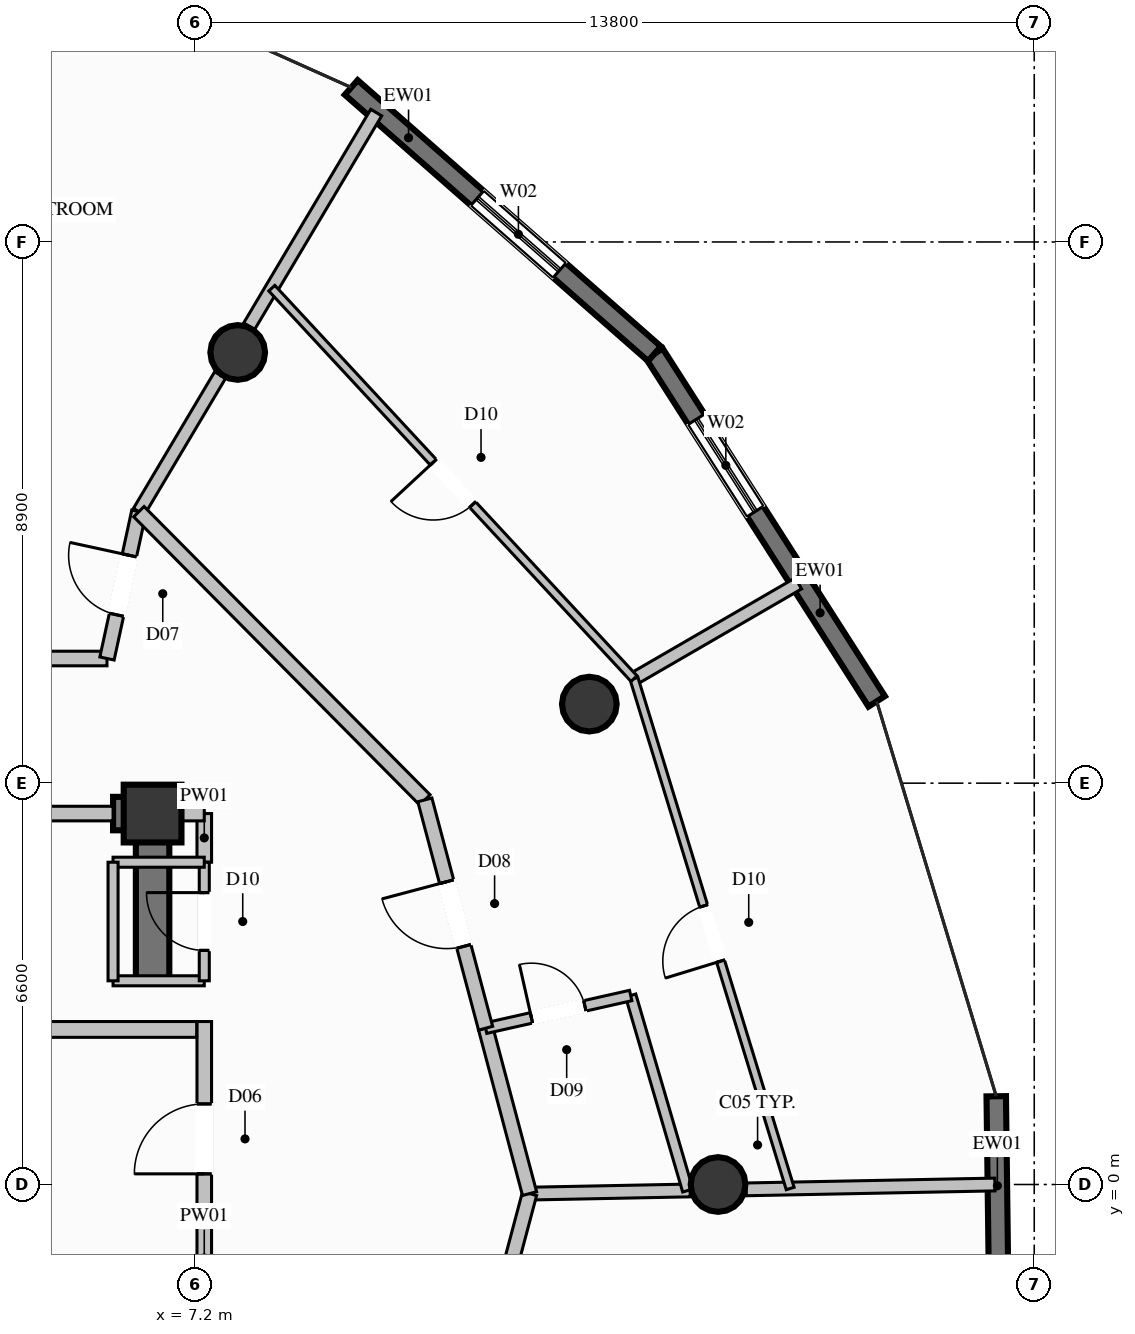
"""IFC4 building model, lengths in metres.
Left out: names, types, materials, properties, quantities, classifications, styles, units other than length and angle.
Written with IfcOpenShell. Run it as: python <this file> out.ifc"""

import sys

from ifc_helpers import new_model, si_unit, direction, frame, frame_2d, origin, origin_2d, place, context, subcontext, project, spatial, rectangle, circle, extrude, element, fill, save


model = new_model("IFC4")
c1 = context("Model", 3, precision=1e-05, world=origin(), true_north=direction((0.0, 1.0)))
c2 = subcontext(c1, "Body", "Model", "MODEL_VIEW")
j1 = project(units=[si_unit("LENGTHUNIT", "METRE"), si_unit("PLANEANGLEUNIT", "RADIAN")], contexts=[c1])
p1 = place(None, origin())
s1 = spatial("IfcSite", under=j1, at=p1, CompositionType="ELEMENT")
p2 = place(p1, origin())
s2 = spatial("IfcBuilding", under=s1, at=p2, CompositionType="ELEMENT")
p3 = place(p2, frame((0.0, 0.0, 205.6)))
s3 = spatial("IfcBuildingStorey", under=s2, at=p3, CompositionType="ELEMENT", Elevation=205.6)
p4 = place(p3, frame((6.5, 6.1, 0.0), z_axis=(0.0, 0.0, 1.0), x_axis=(1.0, 0.0, 0.0)))
e1 = element("IfcColumn", 1, at=p4, inside=s3, PredefinedType="COLUMN", context=c2, shape_type="SweptSolid", body=[
    extrude(rectangle(XDim=0.95, YDim=0.95, at=origin_2d()), origin(), (0.0, 0.0, 1.0), 3.6),
])
p5 = place(p3, frame((5.85, 6.1, 0.0), z_axis=(0.0, 0.0, 1.0), x_axis=(1.0, 0.0, 0.0)))
e2 = element("IfcWall", 2, at=p5, inside=s3, PredefinedType="SHEAR", context=c2, shape_type="SweptSolid", body=[
    extrude(rectangle(XDim=0.375, YDim=0.55, at=frame_2d((0.188, 0.0))), origin(), (0.0, 0.0, 1.0), 3.6),
])
p6 = place(p3, frame((6.5, 3.35, 0.0), z_axis=(0.0, 0.0, 1.0), x_axis=(0.0, 1.0, 0.0)))
e3 = element("IfcWall", 3, at=p6, inside=s3, PredefinedType="SHEAR", context=c2, shape_type="SweptSolid", body=[
    extrude(rectangle(XDim=3.025, YDim=0.55, at=frame_2d((1.512, 0.0))), origin(), (0.0, 0.0, 1.0), 3.6),
])
for number, where, z_axis, x_axis in (
    (4, (15.8, 0.0, 0.0), (0.0, 0.0, 1.0), (1.0, 0.0, 0.0)),
    (5, (13.683, 7.9, 0.0), (0.0, 0.0, 1.0), (1.0, 0.0, 0.0)),
    (6, (7.9, 13.683, 0.0), (0.0, 0.0, 1.0), (1.0, 0.0, 0.0)),
):
    element("IfcColumn", number, at=place(p3, frame(where, z_axis=z_axis, x_axis=x_axis)), inside=s3, PredefinedType="COLUMN", context=c2, shape_type="SweptSolid", body=[
        extrude(circle(Radius=0.45, at=origin_2d()), origin(), (0.0, 0.0, 1.0), 3.6),
    ])
p7 = place(p3, frame((20.375, 1.451, 0.0), z_axis=(0.0, 0.0, 1.0), x_axis=(0.012654885904, -0.999919923725, 0.0)))
e7 = element("IfcWall", 7, at=p7, inside=s3, PredefinedType="SOLIDWALL", context=c2, shape_type="SweptSolid", body=[
    extrude(rectangle(XDim=6.636, YDim=0.32, at=frame_2d((3.318, 0.0))), origin(), (0.0, 0.0, 1.0), 3.36),
])
p8 = place(p7, frame((3.194, 0.0, 0.35)))
e8 = element("IfcOpeningElement", 8, at=p8, cuts=e7, PredefinedType="OPENING", context=c2, shape_type="SweptSolid", body=[
    extrude(rectangle(XDim=1.8, YDim=2.6, at=frame_2d((0.9, 1.3))), frame((0.0, 0.17, 0.0), z_axis=(0.0, -1.0, 0.0), x_axis=(1.0, 0.0, 0.0)), (0.0, 0.0, 1.0), 0.34),
])
p9 = place(p3, frame((14.754, 13.662, 0.0), z_axis=(0.0, 0.0, 1.0), x_axis=(0.538648303683, -0.842530714538, 0.0)))
e9 = element("IfcWall", 9, at=p9, inside=s3, PredefinedType="SOLIDWALL", context=c2, shape_type="SweptSolid", body=[
    extrude(rectangle(XDim=6.786, YDim=0.32, at=frame_2d((3.393, 0.0))), origin(), (0.0, 0.0, 1.0), 3.36),
])
p10 = place(p9, frame((1.279, 0.0, 0.35)))
e10 = element("IfcOpeningElement", 10, at=p10, cuts=e9, PredefinedType="OPENING", context=c2, shape_type="SweptSolid", body=[
    extrude(rectangle(XDim=1.8, YDim=2.6, at=frame_2d((0.9, 1.3))), frame((0.0, 0.17, 0.0), z_axis=(0.0, -1.0, 0.0), x_axis=(1.0, 0.0, 0.0)), (0.0, 0.0, 1.0), 0.34),
])
p11 = place(p3, frame((9.767, 18.041, 0.0), z_axis=(0.0, 0.0, 1.0), x_axis=(0.751422430331, -0.659821438873, 0.0)))
e11 = element("IfcWall", 11, at=p11, inside=s3, PredefinedType="SOLIDWALL", context=c2, shape_type="SweptSolid", body=[
    extrude(rectangle(XDim=6.636, YDim=0.32, at=frame_2d((3.318, 0.0))), origin(), (0.0, 0.0, 1.0), 3.36),
])
p12 = place(p11, frame((2.759, 0.0, 0.35)))
e12 = element("IfcOpeningElement", 12, at=p12, cuts=e11, PredefinedType="OPENING", context=c2, shape_type="SweptSolid", body=[
    extrude(rectangle(XDim=1.8, YDim=2.6, at=frame_2d((0.9, 1.3))), frame((0.0, 0.17, 0.0), z_axis=(0.0, -1.0, 0.0), x_axis=(1.0, 0.0, 0.0)), (0.0, 0.0, 1.0), 0.34),
])
p13 = place(p3, frame((7.35, -2.34, 0.0), z_axis=(0.0, 0.0, 1.0), x_axis=(0.0, 1.0, 0.0)))
e13 = element("IfcWall", 13, at=p13, inside=s3, PredefinedType="PARTITIONING", context=c2, shape_type="SweptSolid", body=[
    extrude(rectangle(XDim=5.02, YDim=0.24, at=frame_2d((2.51, 0.0))), origin(), (0.0, 0.0, 1.0), 2.445),
])
p14 = place(p13, frame((2.515, 0.0, 0.0)))
e14 = element("IfcOpeningElement", 14, at=p14, cuts=e13, PredefinedType="OPENING", context=c2, shape_type="SweptSolid", body=[
    extrude(rectangle(XDim=1.15, YDim=2.2, at=frame_2d((0.575, 1.1))), frame((0.0, 0.13, 0.0), z_axis=(0.0, -1.0, 0.0), x_axis=(1.0, 0.0, 0.0)), (0.0, 0.0, 1.0), 0.26),
])
p15 = place(p3, frame((4.13, 2.55, 0.0), z_axis=(0.0, 0.0, 1.0), x_axis=(1.0, 0.0, 0.0)))
e15 = element("IfcWall", 15, at=p15, inside=s3, PredefinedType="PARTITIONING", context=c2, shape_type="SweptSolid", body=[
    extrude(rectangle(XDim=3.095, YDim=0.26, at=frame_2d((1.548, 0.0))), origin(), (0.0, 0.0, 1.0), 3.36),
])
p16 = place(p3, frame((-5.75, 8.65, 0.0), z_axis=(0.0, 0.0, 1.0), x_axis=(1.0, 0.0, 0.0)))
e16 = element("IfcWall", 16, at=p16, inside=s3, PredefinedType="PARTITIONING", context=c2, shape_type="SweptSolid", body=[
    extrude(rectangle(XDim=11.5, YDim=0.24, at=frame_2d((5.75, 0.0))), origin(), (0.0, 0.0, 1.0), 3.36),
])
p17 = place(p3, frame((3.0, 6.1, 0.0), z_axis=(0.0, 0.0, 1.0), x_axis=(1.0, 0.0, 0.0)))
e17 = element("IfcWall", 17, at=p17, inside=s3, PredefinedType="PARTITIONING", context=c2, shape_type="SweptSolid", body=[
    extrude(rectangle(XDim=2.85, YDim=0.24, at=frame_2d((1.425, 0.0))), origin(), (0.0, 0.0, 1.0), 2.445),
])
p18 = place(p3, frame((7.35, 5.3, 0.0), z_axis=(0.0, 0.0, 1.0), x_axis=(0.0, 1.0, 0.0)))
e18 = element("IfcWall", 18, at=p18, inside=s3, PredefinedType="PARTITIONING", context=c2, shape_type="SweptSolid", body=[
    extrude(rectangle(XDim=0.8, YDim=0.24, at=frame_2d((0.4, 0.0))), origin(), (0.0, 0.0, 1.0), 2.445),
])
p19 = place(p3, frame((6.5, 6.1, 0.0), z_axis=(0.0, 0.0, 1.0), x_axis=(1.0, 0.0, 0.0)))
e19 = element("IfcWall", 19, at=p19, inside=s3, PredefinedType="PARTITIONING", context=c2, shape_type="SweptSolid", body=[
    extrude(rectangle(XDim=0.85, YDim=0.24, at=frame_2d((0.425, 0.0))), origin(), (0.0, 0.0, 1.0), 2.877),
])
p20 = place(p3, frame((5.85, 3.35, 0.0), z_axis=(0.0, 0.0, 1.0), x_axis=(1.0, 0.0, 0.0)))
e20 = element("IfcWall", 20, at=p20, inside=s3, PredefinedType="PARTITIONING", context=c2, shape_type="SweptSolid", body=[
    extrude(rectangle(XDim=1.5, YDim=0.165, at=frame_2d((0.75, 0.0))), origin(), (0.0, 0.0, 1.0), 3.36),
])
p21 = place(p3, frame((7.35, 3.35, 0.0), z_axis=(0.0, 0.0, 1.0), x_axis=(0.0, 1.0, 0.0)))
e21 = element("IfcWall", 21, at=p21, inside=s3, PredefinedType="PARTITIONING", context=c2, shape_type="SweptSolid", body=[
    extrude(rectangle(XDim=1.95, YDim=0.165, at=frame_2d((0.975, 0.0))), origin(), (0.0, 0.0, 1.0), 3.36),
])
p22 = place(p21, frame((0.5, 0.0, 0.0)))
e22 = element("IfcOpeningElement", 22, at=p22, cuts=e21, PredefinedType="OPENING", context=c2, shape_type="SweptSolid", body=[
    extrude(rectangle(XDim=0.95, YDim=2.1, at=frame_2d((0.475, 1.05))), frame((0.0, 0.093, 0.0), z_axis=(0.0, -1.0, 0.0), x_axis=(1.0, 0.0, 0.0)), (0.0, 0.0, 1.0), 0.185),
])
p23 = place(p3, frame((7.35, 5.3, 0.0), z_axis=(0.0, 0.0, 1.0), x_axis=(-1.0, 0.0, 0.0)))
e23 = element("IfcWall", 23, at=p23, inside=s3, PredefinedType="PARTITIONING", context=c2, shape_type="SweptSolid", body=[
    extrude(rectangle(XDim=1.5, YDim=0.165, at=frame_2d((0.75, 0.0))), origin(), (0.0, 0.0, 1.0), 2.445),
])
p24 = place(p3, frame((5.85, 5.3, 0.0), z_axis=(0.0, 0.0, 1.0), x_axis=(0.0, -1.0, 0.0)))
e24 = element("IfcWall", 24, at=p24, inside=s3, PredefinedType="PARTITIONING", context=c2, shape_type="SweptSolid", body=[
    extrude(rectangle(XDim=1.95, YDim=0.165, at=frame_2d((0.975, 0.0))), origin(), (0.0, 0.0, 1.0), 2.445),
])
p25 = place(p3, frame((12.7, -0.15, 0.0), z_axis=(0.0, 0.0, 1.0), x_axis=(0.999806076636, 0.019692869828, 0.0)))
e25 = element("IfcWall", 25, at=p25, inside=s3, PredefinedType="PARTITIONING", context=c2, shape_type="SweptSolid", body=[
    extrude(rectangle(XDim=2.641, YDim=0.21, at=frame_2d((1.32, 0.0))), origin(), (0.0, 0.0, 1.0), 3.36),
])
p26 = place(p3, frame((16.263, -0.08, 0.0), z_axis=(0.0, 0.0, 1.0), x_axis=(0.999808394628, 0.019574831579, 0.0)))
e26 = element("IfcWall", 26, at=p26, inside=s3, PredefinedType="PARTITIONING", context=c2, shape_type="SweptSolid", body=[
    extrude(rectangle(XDim=4.091, YDim=0.21, at=frame_2d((2.045, 0.0))), origin(), (0.0, 0.0, 1.0), 3.36),
])
p27 = place(p3, frame((6.275, 11.065, 0.0), z_axis=(0.0, 0.0, 1.0), x_axis=(0.511099633632, 0.859521474136, 0.0)))
e27 = element("IfcWall", 27, at=p27, inside=s3, PredefinedType="PARTITIONING", context=c2, shape_type="SweptSolid", body=[
    extrude(rectangle(XDim=2.614, YDim=0.21, at=frame_2d((1.307, 0.0))), origin(), (0.0, 0.0, 1.0), 2.877),
])
p28 = place(p3, frame((8.088, 14.114, 0.0), z_axis=(0.0, 0.0, 1.0), x_axis=(0.511207736288, 0.859457183552, 0.0)))
e28 = element("IfcWall", 28, at=p28, inside=s3, PredefinedType="PARTITIONING", context=c2, shape_type="SweptSolid", body=[
    extrude(rectangle(XDim=4.089, YDim=0.21, at=frame_2d((2.044, 0.0))), origin(), (0.0, 0.0, 1.0), 3.36),
])
p29 = place(p3, frame((5.75, 8.65, 0.0), z_axis=(0.0, 0.0, 1.0), x_axis=(0.212388632151, 0.977185278713, 0.0)))
e29 = element("IfcWall", 29, at=p29, inside=s3, PredefinedType="PARTITIONING", context=c2, shape_type="SweptSolid", body=[
    extrude(rectangle(XDim=2.471, YDim=0.24, at=frame_2d((1.236, 0.0))), origin(), (0.0, 0.0, 1.0), 3.36),
])
p30 = place(p29, frame((0.736, 0.0, 0.0)))
e30 = element("IfcOpeningElement", 30, at=p30, cuts=e29, PredefinedType="OPENING", context=c2, shape_type="SweptSolid", body=[
    extrude(rectangle(XDim=1.0, YDim=2.2, at=frame_2d((0.5, 1.1))), frame((0.0, 0.13, 0.0), z_axis=(0.0, -1.0, 0.0), x_axis=(1.0, 0.0, 0.0)), (0.0, 0.0, 1.0), 0.26),
])
p31 = place(p3, frame((11.701, -3.906, 0.0), z_axis=(0.0, 0.0, 1.0), x_axis=(0.257037057674, 0.966401547486, 0.0)))
e31 = element("IfcWall", 31, at=p31, inside=s3, PredefinedType="PARTITIONING", context=c2, shape_type="SweptSolid", body=[
    extrude(rectangle(XDim=3.887, YDim=0.24, at=frame_2d((1.943, 0.0))), origin(), (0.0, 0.0, 1.0), 3.36),
])
p32 = place(p31, frame((1.443, 0.0, 0.0)))
e32 = element("IfcOpeningElement", 32, at=p32, cuts=e31, PredefinedType="OPENING", context=c2, shape_type="SweptSolid", body=[
    extrude(rectangle(XDim=1.0, YDim=2.2, at=frame_2d((0.5, 1.1))), frame((0.0, 0.13, 0.0), z_axis=(0.0, -1.0, 0.0), x_axis=(1.0, 0.0, 0.0)), (0.0, 0.0, 1.0), 0.26),
])
p33 = place(p3, frame((12.7, -0.15, 0.0), z_axis=(0.0, 0.0, 1.0), x_axis=(-0.256858081143, 0.966449132729, 0.0)))
e33 = element("IfcWall", 33, at=p33, inside=s3, PredefinedType="PARTITIONING", context=c2, shape_type="SweptSolid", body=[
    extrude(rectangle(XDim=2.814, YDim=0.24, at=frame_2d((1.407, 0.0))), origin(), (0.0, 0.0, 1.0), 3.36),
])
p34 = place(p3, frame((15.302, -0.099, 0.0), z_axis=(0.0, 0.0, 1.0), x_axis=(-0.280987384428, 0.959711461739, 0.0)))
e34 = element("IfcWall", 34, at=p34, inside=s3, PredefinedType="PLUMBINGWALL", context=c2, shape_type="SweptSolid", body=[
    extrude(rectangle(XDim=3.342, YDim=0.175, at=frame_2d((1.671, 0.0))), origin(), (0.0, 0.0, 1.0), 2.929),
])
p35 = place(p3, frame((11.977, 2.57, 0.0), z_axis=(0.0, 0.0, 1.0), x_axis=(0.975522568514, 0.219899336789, 0.0)))
e35 = element("IfcWall", 35, at=p35, inside=s3, PredefinedType="PLUMBINGWALL", context=c2, shape_type="SweptSolid", body=[
    extrude(rectangle(XDim=2.446, YDim=0.175, at=frame_2d((1.223, 0.0))), origin(), (0.0, 0.0, 1.0), 3.36),
])
p36 = place(p35, frame((0.773, 0.0, 0.0)))
e36 = element("IfcOpeningElement", 36, at=p36, cuts=e35, PredefinedType="OPENING", context=c2, shape_type="SweptSolid", body=[
    extrude(rectangle(XDim=0.9, YDim=2.1, at=frame_2d((0.45, 1.05))), frame((0.0, 0.098, 0.0), z_axis=(0.0, -1.0, 0.0), x_axis=(1.0, 0.0, 0.0)), (0.0, 0.0, 1.0), 0.195),
])
p37 = place(p3, frame((14.418, 8.319, 0.0), z_axis=(0.0, 0.0, 1.0), x_axis=(0.86529427333, 0.501264222285, 0.0)))
e37 = element("IfcWall", 37, at=p37, inside=s3, PredefinedType="PARTITIONING", context=c2, shape_type="SweptSolid", body=[
    extrude(rectangle(XDim=3.124, YDim=0.21, at=frame_2d((1.562, 0.0))), origin(), (0.0, 0.0, 1.0), 3.36),
])
p38 = place(p3, frame((10.978, 6.325, 0.0), z_axis=(0.0, 0.0, 1.0), x_axis=(-0.704340920508, 0.709861865223, 0.0)))
e38 = element("IfcWall", 38, at=p38, inside=s3, PredefinedType="PARTITIONING", context=c2, shape_type="SweptSolid", body=[
    extrude(rectangle(XDim=6.677, YDim=0.24, at=frame_2d((3.339, 0.0))), origin(), (0.0, 0.0, 1.0), 3.36),
])
p39 = place(p3, frame((11.977, 2.57, 0.0), z_axis=(0.0, 0.0, 1.0), x_axis=(-0.257115096486, 0.966380787867, 0.0)))
e39 = element("IfcWall", 39, at=p39, inside=s3, PredefinedType="PARTITIONING", context=c2, shape_type="SweptSolid", body=[
    extrude(rectangle(XDim=3.885, YDim=0.24, at=frame_2d((1.943, 0.0))), origin(), (0.0, 0.0, 1.0), 3.36),
])
p40 = place(p39, frame((1.393, 0.0, 0.0)))
e40 = element("IfcOpeningElement", 40, at=p40, cuts=e39, PredefinedType="OPENING", context=c2, shape_type="SweptSolid", body=[
    extrude(rectangle(XDim=1.1, YDim=2.3, at=frame_2d((0.55, 1.15))), frame((0.0, 0.13, 0.0), z_axis=(0.0, -1.0, 0.0), x_axis=(1.0, 0.0, 0.0)), (0.0, 0.0, 1.0), 0.26),
])
p41 = place(p3, frame((16.986, -0.066, 0.0), z_axis=(0.0, 0.0, 1.0), x_axis=(-0.292847255907, 0.956159236062, 0.0)))
e41 = element("IfcWall", 41, at=p41, inside=s3, PredefinedType="PARTITIONING", context=c2, shape_type="SweptSolid", body=[
    extrude(rectangle(XDim=8.77, YDim=0.135, at=frame_2d((4.385, 0.0))), origin(), (0.0, 0.0, 1.0), 3.36),
])
p42 = place(p41, frame((3.91, 0.0, 0.0)))
e42 = element("IfcOpeningElement", 42, at=p42, cuts=e41, PredefinedType="OPENING", context=c2, shape_type="SweptSolid", body=[
    extrude(rectangle(XDim=0.95, YDim=2.1, at=frame_2d((0.475, 1.05))), frame((0.0, 0.078, 0.0), z_axis=(0.0, -1.0, 0.0), x_axis=(1.0, 0.0, 0.0)), (0.0, 0.0, 1.0), 0.155),
])
p43 = place(p3, frame((14.418, 8.319, 0.0), z_axis=(0.0, 0.0, 1.0), x_axis=(-0.680130290057, 0.733091255266, 0.0)))
e43 = element("IfcWall", 43, at=p43, inside=s3, PredefinedType="PARTITIONING", context=c2, shape_type="SweptSolid", body=[
    extrude(rectangle(XDim=8.759, YDim=0.135, at=frame_2d((4.379, 0.0))), origin(), (0.0, 0.0, 1.0), 3.36),
])
p44 = place(p43, frame((3.904, 0.0, 0.0)))
e44 = element("IfcOpeningElement", 44, at=p44, cuts=e43, PredefinedType="OPENING", context=c2, shape_type="SweptSolid", body=[
    extrude(rectangle(XDim=0.95, YDim=2.1, at=frame_2d((0.475, 1.05))), frame((0.0, 0.078, 0.0), z_axis=(0.0, -1.0, 0.0), x_axis=(1.0, 0.0, 0.0)), (0.0, 0.0, 1.0), 0.155),
])
p45 = place(p10, origin())
e45 = element("IfcWindow", 45, at=p45, inside=s3, PartitioningType="SINGLE_PANEL", PredefinedType="WINDOW", context=c2, shape_type="SweptSolid", body=[
    extrude(rectangle(XDim=1.8, YDim=2.6, at=frame_2d((0.9, 1.3))), frame((0.0, 0.03, 0.0), z_axis=(0.0, -1.0, 0.0), x_axis=(1.0, 0.0, 0.0)), (0.0, 0.0, 1.0), 0.06),
])
fill(e10, e45)
p46 = place(p12, origin())
e46 = element("IfcWindow", 46, at=p46, inside=s3, PartitioningType="SINGLE_PANEL", PredefinedType="WINDOW", context=c2, shape_type="SweptSolid", body=[
    extrude(rectangle(XDim=1.8, YDim=2.6, at=frame_2d((0.9, 1.3))), frame((0.0, 0.03, 0.0), z_axis=(0.0, -1.0, 0.0), x_axis=(1.0, 0.0, 0.0)), (0.0, 0.0, 1.0), 0.06),
])
fill(e12, e46)
p47 = place(p14, origin())
e47 = element("IfcDoor", 47, at=p47, inside=s3, OperationType="SINGLE_SWING_LEFT", PredefinedType="DOOR", context=c2, shape_type="SweptSolid", body=[
    extrude(rectangle(XDim=1.15, YDim=2.2, at=frame_2d((0.575, 1.1))), frame((0.0, 0.025, 0.0), z_axis=(0.0, -1.0, 0.0), x_axis=(1.0, 0.0, 0.0)), (0.0, 0.0, 1.0), 0.05),
])
fill(e14, e47)
p48 = place(p22, origin())
e48 = element("IfcDoor", 48, at=p48, inside=s3, OperationType="SINGLE_SWING_RIGHT", PredefinedType="DOOR", context=c2, shape_type="SweptSolid", body=[
    extrude(rectangle(XDim=0.95, YDim=2.1, at=frame_2d((0.475, 1.05))), frame((0.0, 0.025, 0.0), z_axis=(0.0, -1.0, 0.0), x_axis=(1.0, 0.0, 0.0)), (0.0, 0.0, 1.0), 0.05),
])
fill(e22, e48)
p49 = place(p30, origin())
e49 = element("IfcDoor", 49, at=p49, inside=s3, OperationType="SINGLE_SWING_RIGHT", PredefinedType="DOOR", context=c2, shape_type="SweptSolid", body=[
    extrude(rectangle(XDim=1.0, YDim=2.2, at=frame_2d((0.5, 1.1))), frame((0.0, 0.025, 0.0), z_axis=(0.0, -1.0, 0.0), x_axis=(1.0, 0.0, 0.0)), (0.0, 0.0, 1.0), 0.05),
])
fill(e30, e49)
p50 = place(p36, origin())
e50 = element("IfcDoor", 50, at=p50, inside=s3, OperationType="SINGLE_SWING_LEFT", PredefinedType="DOOR", context=c2, shape_type="SweptSolid", body=[
    extrude(rectangle(XDim=0.9, YDim=2.1, at=frame_2d((0.45, 1.05))), frame((0.0, 0.025, 0.0), z_axis=(0.0, -1.0, 0.0), x_axis=(1.0, 0.0, 0.0)), (0.0, 0.0, 1.0), 0.05),
])
fill(e36, e50)
p51 = place(p40, origin())
e51 = element("IfcDoor", 51, at=p51, inside=s3, OperationType="SINGLE_SWING_RIGHT", PredefinedType="DOOR", context=c2, shape_type="SweptSolid", body=[
    extrude(rectangle(XDim=1.1, YDim=2.3, at=frame_2d((0.55, 1.15))), frame((0.0, 0.025, 0.0), z_axis=(0.0, -1.0, 0.0), x_axis=(1.0, 0.0, 0.0)), (0.0, 0.0, 1.0), 0.05),
])
fill(e40, e51)
p52 = place(p42, origin())
e52 = element("IfcDoor", 52, at=p52, inside=s3, OperationType="SINGLE_SWING_LEFT", PredefinedType="DOOR", context=c2, shape_type="SweptSolid", body=[
    extrude(rectangle(XDim=0.95, YDim=2.1, at=frame_2d((0.475, 1.05))), frame((0.0, 0.025, 0.0), z_axis=(0.0, -1.0, 0.0), x_axis=(1.0, 0.0, 0.0)), (0.0, 0.0, 1.0), 0.05),
])
fill(e42, e52)
p53 = place(p44, origin())
e53 = element("IfcDoor", 53, at=p53, inside=s3, OperationType="SINGLE_SWING_RIGHT", PredefinedType="DOOR", context=c2, shape_type="SweptSolid", body=[
    extrude(rectangle(XDim=0.95, YDim=2.1, at=frame_2d((0.475, 1.05))), frame((0.0, 0.025, 0.0), z_axis=(0.0, -1.0, 0.0), x_axis=(1.0, 0.0, 0.0)), (0.0, 0.0, 1.0), 0.05),
])
fill(e44, e53)
save(model, sys.argv[1])
